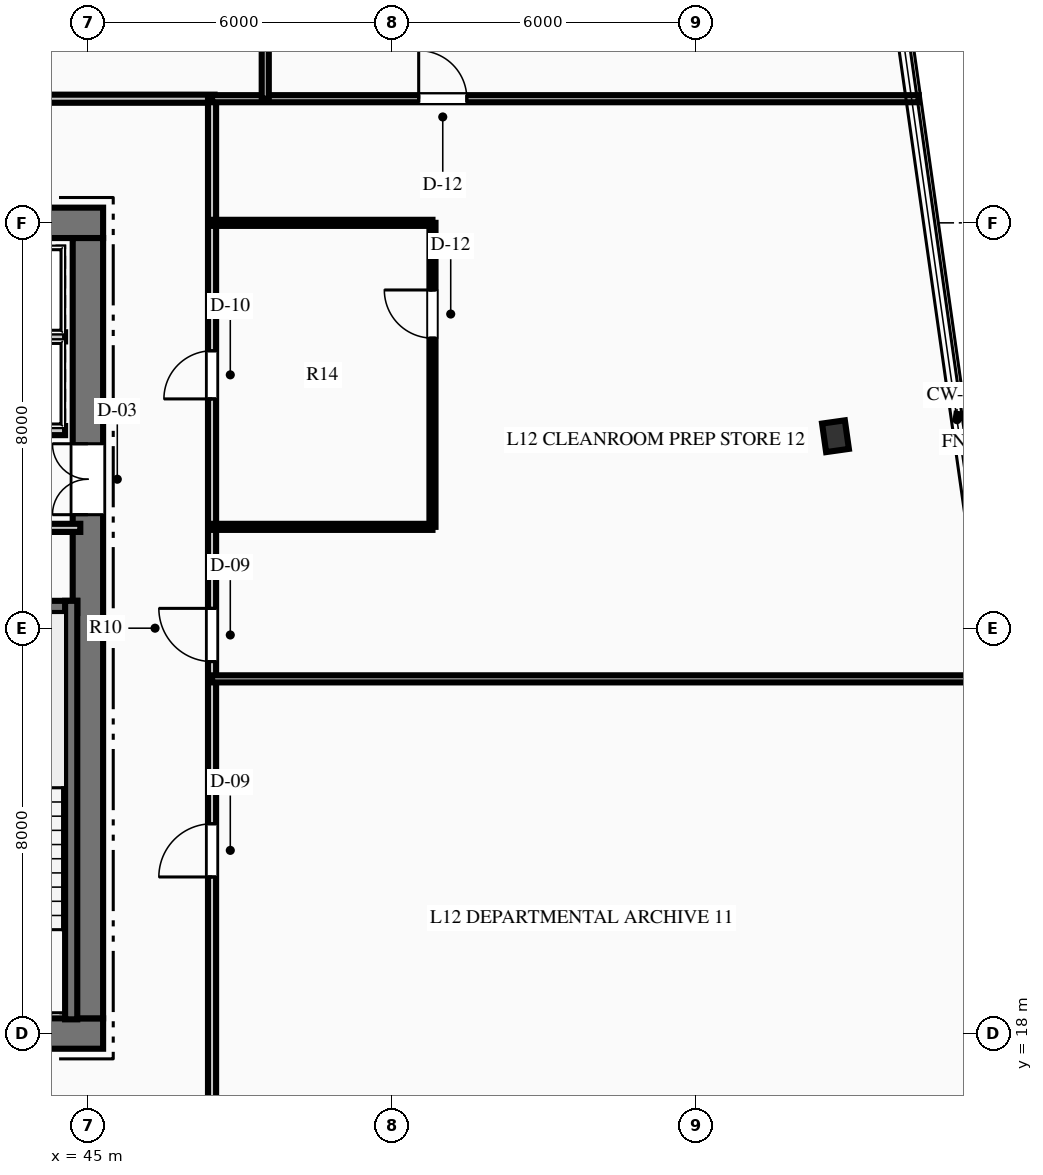
"""IFC4 building model, lengths in metres.
Left out: names, types, materials, properties, quantities, classifications, styles, units other than length and angle.
Written with IfcOpenShell. Run it as: python <this file> out.ifc"""

import sys

from ifc_helpers import new_model, si_unit, direction, frame, frame_2d, origin, origin_2d, place, context, subcontext, project, spatial, rectangle, i_section, extrude, element, fill, save


model = new_model("IFC4")
c1 = context("Model", 3, precision=1e-05, world=origin(), true_north=direction((0.0, 1.0)))
c2 = subcontext(c1, "Body", "Model", "MODEL_VIEW")
j1 = project(units=[si_unit("LENGTHUNIT", "METRE"), si_unit("PLANEANGLEUNIT", "RADIAN")], contexts=[c1])
p1 = place(None, origin())
s1 = spatial("IfcSite", under=j1, at=p1, CompositionType="ELEMENT")
p2 = place(p1, origin())
s2 = spatial("IfcBuilding", under=s1, at=p2, CompositionType="ELEMENT")
p3 = place(p2, frame((0.0, 0.0, 55.2)))
s3 = spatial("IfcBuildingStorey", under=s2, at=p3, CompositionType="ELEMENT", Elevation=55.2)
p4 = place(p3, frame((26.7, 18.0, 0.0), z_axis=(0.0, 0.0, 1.0), x_axis=(1.0, 0.0, 0.0)))
e1 = element("IfcWall", 1, at=p4, inside=s3, PredefinedType="SHEAR", context=c2, shape_type="SweptSolid", body=[
    extrude(rectangle(XDim=18.6, YDim=0.6, at=frame_2d((9.3, 0.0))), origin(), (0.0, 0.0, 1.0), 3.75),
])
p5 = place(p4, frame((7.4, 0.0, 0.0)))
e2 = element("IfcOpeningElement", 2, at=p5, cuts=e1, PredefinedType="OPENING", context=c2, shape_type="SweptSolid", body=[
    extrude(rectangle(XDim=1.1, YDim=2.15, at=frame_2d((0.55, 1.075))), frame((0.0, 0.31, 0.0), z_axis=(0.0, -1.0, 0.0), x_axis=(1.0, 0.0, 0.0)), (0.0, 0.0, 1.0), 0.62),
])
p6 = place(p4, frame((10.1, 0.0, 0.0)))
e3 = element("IfcOpeningElement", 3, at=p6, cuts=e1, PredefinedType="OPENING", context=c2, shape_type="SweptSolid", body=[
    extrude(rectangle(XDim=1.1, YDim=2.15, at=frame_2d((0.55, 1.075))), frame((0.0, 0.31, 0.0), z_axis=(0.0, -1.0, 0.0), x_axis=(1.0, 0.0, 0.0)), (0.0, 0.0, 1.0), 0.62),
])
p7 = place(p3, frame((26.7, 34.0, 0.0), z_axis=(0.0, 0.0, 1.0), x_axis=(1.0, 0.0, 0.0)))
e4 = element("IfcWall", 4, at=p7, inside=s3, PredefinedType="SHEAR", context=c2, shape_type="SweptSolid", body=[
    extrude(rectangle(XDim=18.6, YDim=0.6, at=frame_2d((9.3, 0.0))), origin(), (0.0, 0.0, 1.0), 3.75),
])
p8 = place(p7, frame((1.265, 0.0, 0.0)))
e5 = element("IfcOpeningElement", 5, at=p8, cuts=e4, PredefinedType="OPENING", context=c2, shape_type="SweptSolid", body=[
    extrude(rectangle(XDim=1.1, YDim=2.15, at=frame_2d((0.55, 1.075))), frame((0.0, 0.31, 0.0), z_axis=(0.0, -1.0, 0.0), x_axis=(1.0, 0.0, 0.0)), (0.0, 0.0, 1.0), 0.62),
])
p9 = place(p7, frame((3.515, 0.0, 0.0)))
e6 = element("IfcOpeningElement", 6, at=p9, cuts=e4, PredefinedType="OPENING", context=c2, shape_type="SweptSolid", body=[
    extrude(rectangle(XDim=1.1, YDim=2.15, at=frame_2d((0.55, 1.075))), frame((0.0, 0.31, 0.0), z_axis=(0.0, -1.0, 0.0), x_axis=(1.0, 0.0, 0.0)), (0.0, 0.0, 1.0), 0.62),
])
p10 = place(p7, frame((13.985, 0.0, 0.0)))
e7 = element("IfcOpeningElement", 7, at=p10, cuts=e4, PredefinedType="OPENING", context=c2, shape_type="SweptSolid", body=[
    extrude(rectangle(XDim=1.1, YDim=2.15, at=frame_2d((0.55, 1.075))), frame((0.0, 0.31, 0.0), z_axis=(0.0, -1.0, 0.0), x_axis=(1.0, 0.0, 0.0)), (0.0, 0.0, 1.0), 0.62),
])
p11 = place(p7, frame((16.235, 0.0, 0.0)))
e8 = element("IfcOpeningElement", 8, at=p11, cuts=e4, PredefinedType="OPENING", context=c2, shape_type="SweptSolid", body=[
    extrude(rectangle(XDim=1.1, YDim=2.15, at=frame_2d((0.55, 1.075))), frame((0.0, 0.31, 0.0), z_axis=(0.0, -1.0, 0.0), x_axis=(1.0, 0.0, 0.0)), (0.0, 0.0, 1.0), 0.62),
])
p12 = place(p3, frame((45.0, 18.3, 0.0), z_axis=(0.0, 0.0, 1.0), x_axis=(0.0, 1.0, 0.0)))
e9 = element("IfcWall", 9, at=p12, inside=s3, PredefinedType="SHEAR", context=c2, shape_type="SweptSolid", body=[
    extrude(rectangle(XDim=15.4, YDim=0.6, at=frame_2d((7.7, 0.0))), origin(), (0.0, 0.0, 1.0), 3.75),
])
p13 = place(p12, frame((9.94, 0.0, 0.0)))
e10 = element("IfcOpeningElement", 10, at=p13, cuts=e9, PredefinedType="OPENING", context=c2, shape_type="SweptSolid", body=[
    extrude(rectangle(XDim=1.4, YDim=2.2, at=frame_2d((0.7, 1.1))), frame((0.0, 0.31, 0.0), z_axis=(0.0, -1.0, 0.0), x_axis=(1.0, 0.0, 0.0)), (0.0, 0.0, 1.0), 0.62),
])
p14 = place(p3, frame((40.81, 26.42, 0.0), z_axis=(0.0, 0.0, 1.0), x_axis=(1.0, 0.0, 0.0)))
e11 = element("IfcWall", 11, at=p14, inside=s3, PredefinedType="SHEAR", context=c2, shape_type="SweptSolid", body=[
    extrude(rectangle(XDim=3.98, YDim=0.24, at=frame_2d((1.99, 0.0))), origin(), (0.0, 0.0, 1.0), 3.75),
])
p15 = place(p3, frame((44.67, 18.28, 0.0), z_axis=(0.0, 0.0, 1.0), x_axis=(0.0, 1.0, 0.0)))
e12 = element("IfcWall", 12, at=p15, inside=s3, PredefinedType="SHEAR", context=c2, shape_type="SweptSolid", body=[
    extrude(rectangle(XDim=8.26, YDim=0.24, at=frame_2d((4.13, 0.0))), origin(), (0.0, 0.0, 1.0), 3.75),
])
p16 = place(p3, frame((59.753, 29.789, 0.0), z_axis=(0.0, 0.0, 1.0), x_axis=(0.990146240249, 0.140037219771, 0.0)))
e13 = element("IfcColumn", 13, at=p16, inside=s3, PredefinedType="COLUMN", context=c2, shape_type="SweptSolid", body=[
    extrude(i_section(OverallWidth=0.454, OverallDepth=0.569, WebThickness=0.078, FlangeThickness=0.125, at=origin_2d()), origin(), (0.0, 0.0, 1.0), 3.75),
])
p17 = place(p3, frame((40.8, 27.98, 0.0), z_axis=(0.0, 0.0, 1.0), x_axis=(1.0, 0.0, 0.0)))
e14 = element("IfcWall", 14, at=p17, inside=s3, PredefinedType="PARTITIONING", context=c2, shape_type="SweptSolid", body=[
    extrude(rectangle(XDim=4.05, YDim=0.16, at=frame_2d((2.025, 0.0))), origin(), (0.0, 0.0, 1.0), 3.44),
])
p18 = place(p17, frame((0.407, 0.0, 0.0)))
e15 = element("IfcOpeningElement", 15, at=p18, cuts=e14, PredefinedType="OPENING", context=c2, shape_type="SweptSolid", body=[
    extrude(rectangle(XDim=0.9, YDim=2.15, at=frame_2d((0.45, 1.075))), frame((0.0, 0.09, 0.0), z_axis=(0.0, -1.0, 0.0), x_axis=(1.0, 0.0, 0.0)), (0.0, 0.0, 1.0), 0.18),
])
p19 = place(p17, frame((2.2, 0.0, 0.0)))
e16 = element("IfcOpeningElement", 16, at=p19, cuts=e14, PredefinedType="OPENING", context=c2, shape_type="SweptSolid", body=[
    extrude(rectangle(XDim=0.9, YDim=2.15, at=frame_2d((0.45, 1.075))), frame((0.0, 0.09, 0.0), z_axis=(0.0, -1.0, 0.0), x_axis=(1.0, 0.0, 0.0)), (0.0, 0.0, 1.0), 0.18),
])
p20 = place(p3, frame((40.12, 29.9, 0.0), z_axis=(0.0, 0.0, 1.0), x_axis=(1.0, 0.0, 0.0)))
e17 = element("IfcWall", 17, at=p20, inside=s3, PredefinedType="PARTITIONING", context=c2, shape_type="SweptSolid", body=[
    extrude(rectangle(XDim=4.43, YDim=0.18, at=frame_2d((2.215, 0.0))), origin(), (0.0, 0.0, 1.0), 3.44),
])
p21 = place(p20, frame((0.565, 0.0, 0.0)))
e18 = element("IfcOpeningElement", 18, at=p21, cuts=e17, PredefinedType="OPENING", context=c2, shape_type="SweptSolid", body=[
    extrude(rectangle(XDim=1.1, YDim=2.15, at=frame_2d((0.55, 1.075))), frame((0.0, 0.1, 0.0), z_axis=(0.0, -1.0, 0.0), x_axis=(1.0, 0.0, 0.0)), (0.0, 0.0, 1.0), 0.2),
])
p22 = place(p20, frame((2.815, 0.0, 0.0)))
e19 = element("IfcOpeningElement", 19, at=p22, cuts=e17, PredefinedType="OPENING", context=c2, shape_type="SweptSolid", body=[
    extrude(rectangle(XDim=1.1, YDim=2.15, at=frame_2d((0.55, 1.075))), frame((0.0, 0.1, 0.0), z_axis=(0.0, -1.0, 0.0), x_axis=(1.0, 0.0, 0.0)), (0.0, 0.0, 1.0), 0.2),
])
p23 = place(p3, frame((40.12, 31.75, 0.0), z_axis=(0.0, 0.0, 1.0), x_axis=(1.0, 0.0, 0.0)))
e20 = element("IfcWall", 20, at=p23, inside=s3, PredefinedType="PARTITIONING", context=c2, shape_type="SweptSolid", body=[
    extrude(rectangle(XDim=4.43, YDim=0.18, at=frame_2d((2.215, 0.0))), origin(), (0.0, 0.0, 1.0), 3.44),
])
p24 = place(p3, frame((24.5, 36.45, 0.0), z_axis=(0.0, 0.0, 1.0), x_axis=(1.0, 0.0, 0.0)))
e21 = element("IfcWall", 21, at=p24, inside=s3, PredefinedType="PARTITIONING", context=c2, shape_type="SweptSolid", body=[
    extrude(rectangle(XDim=23.0, YDim=0.16, at=frame_2d((11.5, 0.0))), origin(), (0.0, 0.0, 1.0), 3.44),
])
p25 = place(p24, frame((2.261, 0.0, 0.0)))
e22 = element("IfcOpeningElement", 22, at=p25, cuts=e21, PredefinedType="OPENING", context=c2, shape_type="SweptSolid", body=[
    extrude(rectangle(XDim=1.05, YDim=2.15, at=frame_2d((0.525, 1.075))), frame((0.0, 0.09, 0.0), z_axis=(0.0, -1.0, 0.0), x_axis=(1.0, 0.0, 0.0)), (0.0, 0.0, 1.0), 0.18),
])
p26 = place(p24, frame((12.715, 0.0, 0.0)))
e23 = element("IfcOpeningElement", 23, at=p26, cuts=e21, PredefinedType="OPENING", context=c2, shape_type="SweptSolid", body=[
    extrude(rectangle(XDim=1.05, YDim=2.15, at=frame_2d((0.525, 1.075))), frame((0.0, 0.09, 0.0), z_axis=(0.0, -1.0, 0.0), x_axis=(1.0, 0.0, 0.0)), (0.0, 0.0, 1.0), 0.18),
])
p27 = place(p24, frame((17.489, 0.0, 0.0)))
e24 = element("IfcOpeningElement", 24, at=p27, cuts=e21, PredefinedType="OPENING", context=c2, shape_type="SweptSolid", body=[
    extrude(rectangle(XDim=1.05, YDim=2.15, at=frame_2d((0.525, 1.075))), frame((0.0, 0.09, 0.0), z_axis=(0.0, -1.0, 0.0), x_axis=(1.0, 0.0, 0.0)), (0.0, 0.0, 1.0), 0.18),
])
p28 = place(p3, frame((47.45, 15.55, 0.0), z_axis=(0.0, 0.0, 1.0), x_axis=(0.0, 1.0, 0.0)))
e25 = element("IfcWall", 25, at=p28, inside=s3, PredefinedType="PARTITIONING", context=c2, shape_type="SweptSolid", body=[
    extrude(rectangle(XDim=20.9, YDim=0.16, at=frame_2d((10.45, 0.0))), origin(), (0.0, 0.0, 1.0), 3.44),
])
p29 = place(p28, frame((14.975, 0.0, 0.0)))
e26 = element("IfcOpeningElement", 26, at=p29, cuts=e25, PredefinedType="OPENING", context=c2, shape_type="SweptSolid", body=[
    extrude(rectangle(XDim=0.95, YDim=2.15, at=frame_2d((0.475, 1.075))), frame((0.0, 0.09, 0.0), z_axis=(0.0, -1.0, 0.0), x_axis=(1.0, 0.0, 0.0)), (0.0, 0.0, 1.0), 0.18),
])
p30 = place(p28, frame((5.54, 0.0, 0.0)))
e27 = element("IfcOpeningElement", 27, at=p30, cuts=e25, PredefinedType="OPENING", context=c2, shape_type="SweptSolid", body=[
    extrude(rectangle(XDim=1.05, YDim=2.15, at=frame_2d((0.525, 1.075))), frame((0.0, 0.09, 0.0), z_axis=(0.0, -1.0, 0.0), x_axis=(1.0, 0.0, 0.0)), (0.0, 0.0, 1.0), 0.18),
])
p31 = place(p28, frame((9.791, 0.0, 0.0)))
e28 = element("IfcOpeningElement", 28, at=p31, cuts=e25, PredefinedType="OPENING", context=c2, shape_type="SweptSolid", body=[
    extrude(rectangle(XDim=1.05, YDim=2.15, at=frame_2d((0.525, 1.075))), frame((0.0, 0.09, 0.0), z_axis=(0.0, -1.0, 0.0), x_axis=(1.0, 0.0, 0.0)), (0.0, 0.0, 1.0), 0.18),
])
p32 = place(p3, frame((47.45, 36.45, 0.0), z_axis=(0.0, 0.0, 1.0), x_axis=(1.0, 0.0, 0.0)))
e29 = element("IfcWall", 29, at=p32, inside=s3, PredefinedType="PARTITIONING", context=c2, shape_type="SweptSolid", body=[
    extrude(rectangle(XDim=13.947, YDim=0.14, at=frame_2d((6.974, 0.0))), origin(), (0.0, 0.0, 1.0), 3.44),
])
p33 = place(p32, frame((4.078, 0.0, 0.0)))
e30 = element("IfcOpeningElement", 30, at=p33, cuts=e29, PredefinedType="OPENING", context=c2, shape_type="SweptSolid", body=[
    extrude(rectangle(XDim=0.95, YDim=2.15, at=frame_2d((0.475, 1.075))), frame((0.0, 0.08, 0.0), z_axis=(0.0, -1.0, 0.0), x_axis=(1.0, 0.0, 0.0)), (0.0, 0.0, 1.0), 0.16),
])
p34 = place(p3, frame((48.5, 36.45, 0.0), z_axis=(0.0, 0.0, 1.0), x_axis=(0.0, 1.0, 0.0)))
e31 = element("IfcWall", 31, at=p34, inside=s3, PredefinedType="PARTITIONING", context=c2, shape_type="SweptSolid", body=[
    extrude(rectangle(XDim=17.183, YDim=0.14, at=frame_2d((8.591, 0.0))), origin(), (0.0, 0.0, 1.0), 3.44),
])
p35 = place(p3, frame((47.45, 25.0, 0.0), z_axis=(0.0, 0.0, 1.0), x_axis=(1.0, 0.0, 0.0)))
e32 = element("IfcWall", 32, at=p35, inside=s3, PredefinedType="PARTITIONING", context=c2, shape_type="SweptSolid", body=[
    extrude(rectangle(XDim=15.566, YDim=0.14, at=frame_2d((7.783, 0.0))), origin(), (0.0, 0.0, 1.0), 3.44),
])
p36 = place(p3, frame((47.45, 34.0, 0.0), z_axis=(0.0, 0.0, 1.0), x_axis=(1.0, 0.0, 0.0)))
e33 = element("IfcWall", 33, at=p36, inside=s3, PredefinedType="PARTITIONING", context=c2, shape_type="SweptSolid", body=[
    extrude(rectangle(XDim=4.35, YDim=0.12, at=frame_2d((2.175, 0.0))), origin(), (0.0, 0.0, 1.0), 3.44),
])
p37 = place(p3, frame((51.8, 28.0, 0.0), z_axis=(0.0, 0.0, 1.0), x_axis=(0.0, 1.0, 0.0)))
e34 = element("IfcWall", 34, at=p37, inside=s3, PredefinedType="PARTITIONING", context=c2, shape_type="SweptSolid", body=[
    extrude(rectangle(XDim=6.0, YDim=0.12, at=frame_2d((3.0, 0.0))), origin(), (0.0, 0.0, 1.0), 3.44),
])
p38 = place(p37, frame((3.725, 0.0, 0.0)))
e35 = element("IfcOpeningElement", 35, at=p38, cuts=e34, PredefinedType="OPENING", context=c2, shape_type="SweptSolid", body=[
    extrude(rectangle(XDim=0.95, YDim=2.15, at=frame_2d((0.475, 1.075))), frame((0.0, 0.07, 0.0), z_axis=(0.0, -1.0, 0.0), x_axis=(1.0, 0.0, 0.0)), (0.0, 0.0, 1.0), 0.14),
])
p39 = place(p3, frame((47.45, 28.0, 0.0), z_axis=(0.0, 0.0, 1.0), x_axis=(1.0, 0.0, 0.0)))
e36 = element("IfcWall", 36, at=p39, inside=s3, PredefinedType="PARTITIONING", context=c2, shape_type="SweptSolid", body=[
    extrude(rectangle(XDim=4.35, YDim=0.12, at=frame_2d((2.175, 0.0))), origin(), (0.0, 0.0, 1.0), 3.44),
])
p40 = place(p13, origin())
e37 = element("IfcDoor", 37, at=p40, inside=s3, OperationType="DOUBLE_DOOR_SINGLE_SWING", PredefinedType="DOOR", context=c2, shape_type="SweptSolid", body=[
    extrude(rectangle(XDim=1.4, YDim=2.2, at=frame_2d((0.7, 1.1))), frame((0.0, 0.025, 0.0), z_axis=(0.0, -1.0, 0.0), x_axis=(1.0, 0.0, 0.0)), (0.0, 0.0, 1.0), 0.05),
])
fill(e10, e37)
p41 = place(p29, origin())
e38 = element("IfcDoor", 38, at=p41, inside=s3, OperationType="SINGLE_SWING_LEFT", PredefinedType="DOOR", context=c2, shape_type="SweptSolid", body=[
    extrude(rectangle(XDim=0.95, YDim=2.15, at=frame_2d((0.475, 1.075))), frame((0.0, 0.025, 0.0), z_axis=(0.0, -1.0, 0.0), x_axis=(1.0, 0.0, 0.0)), (0.0, 0.0, 1.0), 0.05),
])
fill(e26, e38)
p42 = place(p38, origin())
e39 = element("IfcDoor", 39, at=p42, inside=s3, OperationType="SINGLE_SWING_RIGHT", PredefinedType="DOOR", context=c2, shape_type="SweptSolid", body=[
    extrude(rectangle(XDim=0.95, YDim=2.15, at=frame_2d((0.475, 1.075))), frame((0.0, 0.025, 0.0), z_axis=(0.0, -1.0, 0.0), x_axis=(1.0, 0.0, 0.0)), (0.0, 0.0, 1.0), 0.05),
])
fill(e35, e39)
p43 = place(p33, origin())
e40 = element("IfcDoor", 40, at=p43, inside=s3, OperationType="SINGLE_SWING_LEFT", PredefinedType="DOOR", context=c2, shape_type="SweptSolid", body=[
    extrude(rectangle(XDim=0.95, YDim=2.15, at=frame_2d((0.475, 1.075))), frame((0.0, 0.025, 0.0), z_axis=(0.0, -1.0, 0.0), x_axis=(1.0, 0.0, 0.0)), (0.0, 0.0, 1.0), 0.05),
])
fill(e30, e40)
p44 = place(p30, origin())
e41 = element("IfcDoor", 41, at=p44, inside=s3, OperationType="SINGLE_SWING_LEFT", PredefinedType="DOOR", context=c2, shape_type="SweptSolid", body=[
    extrude(rectangle(XDim=1.05, YDim=2.15, at=frame_2d((0.525, 1.075))), frame((0.0, 0.025, 0.0), z_axis=(0.0, -1.0, 0.0), x_axis=(1.0, 0.0, 0.0)), (0.0, 0.0, 1.0), 0.05),
])
fill(e27, e41)
p45 = place(p31, origin())
e42 = element("IfcDoor", 42, at=p45, inside=s3, OperationType="SINGLE_SWING_RIGHT", PredefinedType="DOOR", context=c2, shape_type="SweptSolid", body=[
    extrude(rectangle(XDim=1.05, YDim=2.15, at=frame_2d((0.525, 1.075))), frame((0.0, 0.025, 0.0), z_axis=(0.0, -1.0, 0.0), x_axis=(1.0, 0.0, 0.0)), (0.0, 0.0, 1.0), 0.05),
])
fill(e28, e42)
save(model, sys.argv[1])
